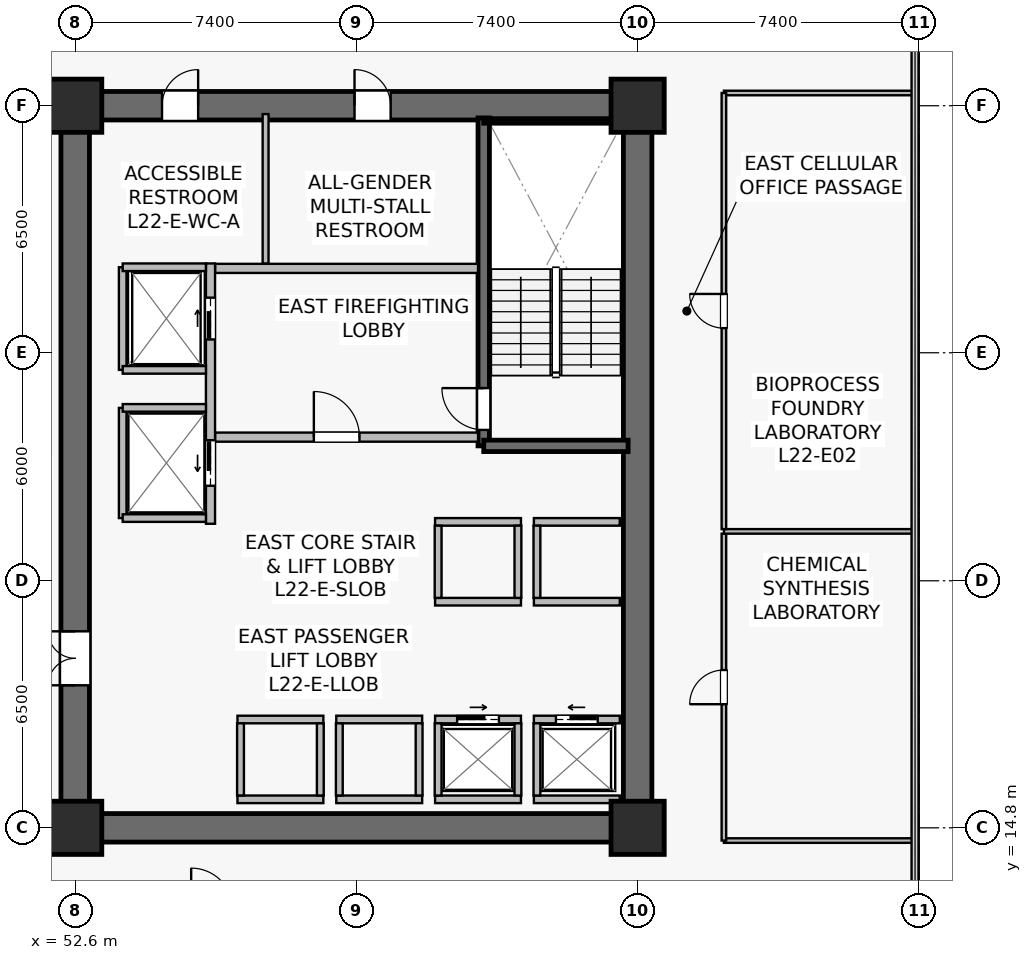
"""IFC4 building model, lengths in metres.
Left out: names, types, materials, properties, quantities, classifications, styles, units other than length and angle.
Written with IfcOpenShell. Run it as: python <this file> out.ifc"""

import sys

from ifc_helpers import new_model, si_unit, direction, frame, frame_2d, origin, origin_2d, place, context, subcontext, project, spatial, rectangle, extrude, source, transform, mapped, element, fill, save


model = new_model("IFC4")
c1 = context("Model", 3, precision=1e-05, world=origin(), true_north=direction((0.0, 1.0)))
c2 = subcontext(c1, "Body", "Model", "MODEL_VIEW")
j1 = project(units=[si_unit("LENGTHUNIT", "METRE"), si_unit("PLANEANGLEUNIT", "RADIAN")], contexts=[c1])
p1 = place(None, origin())
s1 = spatial("IfcSite", under=j1, at=p1, CompositionType="ELEMENT")
p2 = place(p1, origin())
s2 = spatial("IfcBuilding", under=s1, at=p2, CompositionType="ELEMENT")
p3 = place(p2, frame((0.0, 0.0, 90.8)))
s3 = spatial("IfcBuildingStorey", under=s2, at=p3, CompositionType="ELEMENT", Elevation=90.8)
p4 = place(p3, frame((52.225, 14.8, 0.0), z_axis=(0.0, 0.0, 1.0), x_axis=(1.0, 0.0, 0.0)))
e1 = element("IfcWall", 1, at=p4, inside=s3, PredefinedType="SHEAR", context=c2, shape_type="SweptSolid", body=[
    extrude(rectangle(XDim=15.55, YDim=0.75, at=frame_2d((7.775, 0.0))), origin(), (0.0, 0.0, 1.0), 3.78),
])
p5 = place(p3, frame((52.225, 33.8, 0.0), z_axis=(0.0, 0.0, 1.0), x_axis=(1.0, 0.0, 0.0)))
e2 = element("IfcWall", 2, at=p5, inside=s3, PredefinedType="SHEAR", context=c2, shape_type="SweptSolid", body=[
    extrude(rectangle(XDim=15.55, YDim=0.75, at=frame_2d((7.775, 0.0))), origin(), (0.0, 0.0, 1.0), 3.78),
])
p6 = place(p5, frame((7.725, 0.0, 0.0)))
e3 = element("IfcOpeningElement", 3, at=p6, cuts=e2, PredefinedType="OPENING", context=c2, shape_type="SweptSolid", body=[
    extrude(rectangle(XDim=0.95, YDim=2.15, at=frame_2d((0.475, 1.075))), frame((0.0, 0.385, 0.0), z_axis=(0.0, -1.0, 0.0), x_axis=(1.0, 0.0, 0.0)), (0.0, 0.0, 1.0), 0.77),
])
p7 = place(p5, frame((2.66, 0.0, 0.0)))
e4 = element("IfcOpeningElement", 4, at=p7, cuts=e2, PredefinedType="OPENING", context=c2, shape_type="SweptSolid", body=[
    extrude(rectangle(XDim=0.95, YDim=2.15, at=frame_2d((0.475, 1.075))), frame((0.0, 0.385, 0.0), z_axis=(0.0, -1.0, 0.0), x_axis=(1.0, 0.0, 0.0)), (0.0, 0.0, 1.0), 0.77),
])
p8 = place(p3, frame((52.6, 15.175, 0.0), z_axis=(0.0, 0.0, 1.0), x_axis=(0.0, 1.0, 0.0)))
e5 = element("IfcWall", 5, at=p8, inside=s3, PredefinedType="SHEAR", context=c2, shape_type="SweptSolid", body=[
    extrude(rectangle(XDim=18.25, YDim=0.75, at=frame_2d((9.125, 0.0))), origin(), (0.0, 0.0, 1.0), 3.78),
])
p9 = place(p8, frame((3.375, 0.0, 0.0)))
e6 = element("IfcOpeningElement", 6, at=p9, cuts=e5, PredefinedType="OPENING", context=c2, shape_type="SweptSolid", body=[
    extrude(rectangle(XDim=1.42, YDim=2.2, at=frame_2d((0.71, 1.1))), frame((0.0, 0.385, 0.0), z_axis=(0.0, -1.0, 0.0), x_axis=(1.0, 0.0, 0.0)), (0.0, 0.0, 1.0), 0.77),
])
p10 = place(p3, frame((67.4, 15.175, 0.0), z_axis=(0.0, 0.0, 1.0), x_axis=(0.0, 1.0, 0.0)))
e7 = element("IfcWall", 7, at=p10, inside=s3, PredefinedType="SHEAR", context=c2, shape_type="SweptSolid", body=[
    extrude(rectangle(XDim=18.25, YDim=0.75, at=frame_2d((9.125, 0.0))), origin(), (0.0, 0.0, 1.0), 3.78),
])
p11 = place(p3, frame((63.35, 24.85, 0.0), z_axis=(0.0, 0.0, 1.0), x_axis=(0.0, 1.0, 0.0)))
e8 = element("IfcWall", 8, at=p11, inside=s3, PredefinedType="SHEAR", context=c2, shape_type="SweptSolid", body=[
    extrude(rectangle(XDim=8.63, YDim=0.3, at=frame_2d((4.315, 0.0))), origin(), (0.0, 0.0, 1.0), 3.78),
])
p12 = place(p11, frame((0.42, 0.0, 0.0)))
e9 = element("IfcOpeningElement", 9, at=p12, cuts=e8, PredefinedType="OPENING", context=c2, shape_type="SweptSolid", body=[
    extrude(rectangle(XDim=1.1, YDim=2.15, at=frame_2d((0.55, 1.075))), frame((0.0, 0.16, 0.0), z_axis=(0.0, -1.0, 0.0), x_axis=(1.0, 0.0, 0.0)), (0.0, 0.0, 1.0), 0.32),
])
p13 = place(p3, frame((63.35, 24.85, 0.0), z_axis=(0.0, 0.0, 1.0), x_axis=(1.0, 0.0, 0.0)))
e10 = element("IfcWall", 10, at=p13, inside=s3, PredefinedType="SHEAR", context=c2, shape_type="SweptSolid", body=[
    extrude(rectangle(XDim=3.8, YDim=0.3, at=frame_2d((1.9, 0.0))), origin(), (0.0, 0.0, 1.0), 3.78),
])
p14 = place(p3, frame((63.35, 33.4, 0.0), z_axis=(0.0, 0.0, 1.0), x_axis=(1.0, 0.0, 0.0)))
e11 = element("IfcWall", 11, at=p14, inside=s3, PredefinedType="SOLIDWALL", context=c2, shape_type="SweptSolid", body=[
    extrude(rectangle(XDim=3.72, YDim=0.12, at=frame_2d((1.86, 0.0))), origin(), (0.0, 0.0, 1.0), 3.78),
])
m1 = source(origin(), c2, "Body", "SweptSolid", [
    extrude(rectangle(XDim=1.4, YDim=1.4, at=origin_2d()), origin(), (0.0, 0.0, 1.0), 4.1),
])
for number, where, z_axis, x_axis in (
    (12, (52.6, 14.8, 0.0), (0.0, 0.0, 1.0), (1.0, 0.0, 0.0)),
    (13, (67.4, 14.8, 0.0), (0.0, 0.0, 1.0), (1.0, 0.0, 0.0)),
    (14, (52.6, 33.8, 0.0), (0.0, 0.0, 1.0), (1.0, 0.0, 0.0)),
    (15, (67.4, 33.8, 0.0), (0.0, 0.0, 1.0), (1.0, 0.0, 0.0)),
):
    element("IfcColumn", number, at=place(p3, frame(where, z_axis=z_axis, x_axis=x_axis)), inside=s3, PredefinedType="COLUMN", context=c2, shape_type="MappedRepresentation", body=[
        mapped(m1, transform((0.0, 0.0, 0.0), scale=1.0)),
    ])
p15 = place(p3, frame((56.28, 25.08, 0.0), z_axis=(0.0, 0.0, 1.0), x_axis=(1.0, 0.0, 0.0)))
e16 = element("IfcWall", 16, at=p15, inside=s3, PredefinedType="SOLIDWALL", context=c2, shape_type="SweptSolid", body=[
    extrude(rectangle(XDim=6.92, YDim=0.24, at=frame_2d((3.46, 0.0))), origin(), (0.0, 0.0, 1.0), 3.115),
])
p16 = place(p15, frame((2.6, 0.0, 0.0)))
e17 = element("IfcOpeningElement", 17, at=p16, cuts=e16, PredefinedType="OPENING", context=c2, shape_type="SweptSolid", body=[
    extrude(rectangle(XDim=1.2, YDim=2.16, at=frame_2d((0.6, 1.08))), frame((0.0, 0.13, 0.0), z_axis=(0.0, -1.0, 0.0), x_axis=(1.0, 0.0, 0.0)), (0.0, 0.0, 1.0), 0.26),
])
p17 = place(p3, frame((56.28, 29.52, 0.0), z_axis=(0.0, 0.0, 1.0), x_axis=(1.0, 0.0, 0.0)))
e18 = element("IfcWall", 18, at=p17, inside=s3, PredefinedType="SOLIDWALL", context=c2, shape_type="SweptSolid", body=[
    extrude(rectangle(XDim=6.92, YDim=0.24, at=frame_2d((3.46, 0.0))), origin(), (0.0, 0.0, 1.0), 3.115),
])
p18 = place(p3, frame((56.16, 22.8, 0.0), z_axis=(0.0, 0.0, 1.0), x_axis=(0.0, 1.0, 0.0)))
e19 = element("IfcWall", 19, at=p18, inside=s3, PredefinedType="SOLIDWALL", context=c2, shape_type="SweptSolid", body=[
    extrude(rectangle(XDim=6.85, YDim=0.24, at=frame_2d((3.425, 0.0))), origin(), (0.0, 0.0, 1.0), 2.865),
])
p19 = place(p18, frame((4.85, 0.0, 0.0)))
e20 = element("IfcOpeningElement", 20, at=p19, cuts=e19, PredefinedType="OPENING", context=c2, shape_type="SweptSolid", body=[
    extrude(rectangle(XDim=1.1, YDim=2.22, at=frame_2d((0.55, 1.11))), frame((0.0, 0.13, 0.0), z_axis=(0.0, -1.0, 0.0), x_axis=(1.0, 0.0, 0.0)), (0.0, 0.0, 1.0), 0.26),
])
p20 = place(p18, frame((1.0, 0.0, 0.0)))
e21 = element("IfcOpeningElement", 21, at=p20, cuts=e19, PredefinedType="OPENING", context=c2, shape_type="SweptSolid", body=[
    extrude(rectangle(XDim=1.2, YDim=2.22, at=frame_2d((0.6, 1.11))), frame((0.0, 0.13, 0.0), z_axis=(0.0, -1.0, 0.0), x_axis=(1.0, 0.0, 0.0)), (0.0, 0.0, 1.0), 0.26),
])
p21 = place(p3, frame((64.67, 17.65, 0.0), z_axis=(0.0, 0.0, 1.0), x_axis=(1.0, 0.0, 0.0)))
e22 = element("IfcWall", 22, at=p21, inside=s3, PredefinedType="SOLIDWALL", context=c2, shape_type="SweptSolid", body=[
    extrude(rectangle(XDim=2.26, YDim=0.2, at=frame_2d((1.13, 0.0))), origin(), (0.0, 0.0, 1.0), 3.78),
])
p22 = place(p21, frame((0.58, 0.0, 0.0)))
e23 = element("IfcOpeningElement", 23, at=p22, cuts=e22, PredefinedType="OPENING", context=c2, shape_type="SweptSolid", body=[
    extrude(rectangle(XDim=1.1, YDim=2.22, at=frame_2d((0.55, 1.11))), frame((0.0, 0.11, 0.0), z_axis=(0.0, -1.0, 0.0), x_axis=(1.0, 0.0, 0.0)), (0.0, 0.0, 1.0), 0.22),
])
p23 = place(p3, frame((64.67, 15.55, 0.0), z_axis=(0.0, 0.0, 1.0), x_axis=(1.0, 0.0, 0.0)))
e24 = element("IfcWall", 24, at=p23, inside=s3, PredefinedType="SOLIDWALL", context=c2, shape_type="SweptSolid", body=[
    extrude(rectangle(XDim=2.26, YDim=0.2, at=frame_2d((1.13, 0.0))), origin(), (0.0, 0.0, 1.0), 3.78),
])
p24 = place(p3, frame((64.75, 15.65, 0.0), z_axis=(0.0, 0.0, 1.0), x_axis=(0.0, 1.0, 0.0)))
e25 = element("IfcWall", 25, at=p24, inside=s3, PredefinedType="SOLIDWALL", context=c2, shape_type="SweptSolid", body=[
    extrude(rectangle(XDim=1.9, YDim=0.18, at=frame_2d((0.95, 0.0))), origin(), (0.0, 0.0, 1.0), 3.78),
])
p25 = place(p3, frame((62.07, 17.65, 0.0), z_axis=(0.0, 0.0, 1.0), x_axis=(1.0, 0.0, 0.0)))
e26 = element("IfcWall", 26, at=p25, inside=s3, PredefinedType="SOLIDWALL", context=c2, shape_type="SweptSolid", body=[
    extrude(rectangle(XDim=2.26, YDim=0.2, at=frame_2d((1.13, 0.0))), origin(), (0.0, 0.0, 1.0), 3.78),
])
p26 = place(p25, frame((0.58, 0.0, 0.0)))
e27 = element("IfcOpeningElement", 27, at=p26, cuts=e26, PredefinedType="OPENING", context=c2, shape_type="SweptSolid", body=[
    extrude(rectangle(XDim=1.1, YDim=2.22, at=frame_2d((0.55, 1.11))), frame((0.0, 0.11, 0.0), z_axis=(0.0, -1.0, 0.0), x_axis=(1.0, 0.0, 0.0)), (0.0, 0.0, 1.0), 0.22),
])
p27 = place(p3, frame((62.07, 15.55, 0.0), z_axis=(0.0, 0.0, 1.0), x_axis=(1.0, 0.0, 0.0)))
e28 = element("IfcWall", 28, at=p27, inside=s3, PredefinedType="SOLIDWALL", context=c2, shape_type="SweptSolid", body=[
    extrude(rectangle(XDim=2.26, YDim=0.2, at=frame_2d((1.13, 0.0))), origin(), (0.0, 0.0, 1.0), 3.78),
])
for number, where, z_axis, x_axis in (
    (29, (62.15, 15.65, 0.0), (0.0, 0.0, 1.0), (0.0, 1.0, 0.0)),
    (30, (64.25, 15.65, 0.0), (0.0, 0.0, 1.0), (0.0, 1.0, 0.0)),
):
    element("IfcWall", number, at=place(p3, frame(where, z_axis=z_axis, x_axis=x_axis)), inside=s3, PredefinedType="SOLIDWALL", context=c2, shape_type="SweptSolid", body=[
        extrude(rectangle(XDim=1.9, YDim=0.18, at=frame_2d((0.95, 0.0))), origin(), (0.0, 0.0, 1.0), 3.78),
    ])
for number, where, z_axis, x_axis in (
    (31, (59.47, 17.65, 0.0), (0.0, 0.0, 1.0), (1.0, 0.0, 0.0)),
    (32, (59.47, 15.55, 0.0), (0.0, 0.0, 1.0), (1.0, 0.0, 0.0)),
):
    element("IfcWall", number, at=place(p3, frame(where, z_axis=z_axis, x_axis=x_axis)), inside=s3, PredefinedType="SOLIDWALL", context=c2, shape_type="SweptSolid", body=[
        extrude(rectangle(XDim=2.26, YDim=0.2, at=frame_2d((1.13, 0.0))), origin(), (0.0, 0.0, 1.0), 3.115),
    ])
for number, where, z_axis, x_axis in (
    (33, (59.55, 15.65, 0.0), (0.0, 0.0, 1.0), (0.0, 1.0, 0.0)),
    (34, (61.65, 15.65, 0.0), (0.0, 0.0, 1.0), (0.0, 1.0, 0.0)),
):
    element("IfcWall", number, at=place(p3, frame(where, z_axis=z_axis, x_axis=x_axis)), inside=s3, PredefinedType="SOLIDWALL", context=c2, shape_type="SweptSolid", body=[
        extrude(rectangle(XDim=1.9, YDim=0.18, at=frame_2d((0.95, 0.0))), origin(), (0.0, 0.0, 1.0), 3.78),
    ])
for number, where, z_axis, x_axis in (
    (35, (56.87, 17.65, 0.0), (0.0, 0.0, 1.0), (1.0, 0.0, 0.0)),
    (36, (56.87, 15.55, 0.0), (0.0, 0.0, 1.0), (1.0, 0.0, 0.0)),
):
    element("IfcWall", number, at=place(p3, frame(where, z_axis=z_axis, x_axis=x_axis)), inside=s3, PredefinedType="SOLIDWALL", context=c2, shape_type="SweptSolid", body=[
        extrude(rectangle(XDim=2.26, YDim=0.2, at=frame_2d((1.13, 0.0))), origin(), (0.0, 0.0, 1.0), 3.78),
    ])
for number, where, z_axis, x_axis in (
    (37, (56.95, 15.65, 0.0), (0.0, 0.0, 1.0), (0.0, 1.0, 0.0)),
    (38, (59.05, 15.65, 0.0), (0.0, 0.0, 1.0), (0.0, 1.0, 0.0)),
):
    element("IfcWall", number, at=place(p3, frame(where, z_axis=z_axis, x_axis=x_axis)), inside=s3, PredefinedType="SOLIDWALL", context=c2, shape_type="SweptSolid", body=[
        extrude(rectangle(XDim=1.9, YDim=0.18, at=frame_2d((0.95, 0.0))), origin(), (0.0, 0.0, 1.0), 3.78),
    ])
for number, where, z_axis, x_axis in (
    (39, (64.67, 20.75, 0.0), (0.0, 0.0, 1.0), (1.0, 0.0, 0.0)),
    (40, (64.67, 22.85, 0.0), (0.0, 0.0, 1.0), (1.0, 0.0, 0.0)),
):
    element("IfcWall", number, at=place(p3, frame(where, z_axis=z_axis, x_axis=x_axis)), inside=s3, PredefinedType="SOLIDWALL", context=c2, shape_type="SweptSolid", body=[
        extrude(rectangle(XDim=2.26, YDim=0.2, at=frame_2d((1.13, 0.0))), origin(), (0.0, 0.0, 1.0), 3.78),
    ])
p28 = place(p3, frame((64.75, 20.85, 0.0), z_axis=(0.0, 0.0, 1.0), x_axis=(0.0, 1.0, 0.0)))
e41 = element("IfcWall", 41, at=p28, inside=s3, PredefinedType="SOLIDWALL", context=c2, shape_type="SweptSolid", body=[
    extrude(rectangle(XDim=1.9, YDim=0.18, at=frame_2d((0.95, 0.0))), origin(), (0.0, 0.0, 1.0), 3.78),
])
for number, where, z_axis, x_axis in (
    (42, (62.07, 20.75, 0.0), (0.0, 0.0, 1.0), (1.0, 0.0, 0.0)),
    (43, (62.07, 22.85, 0.0), (0.0, 0.0, 1.0), (1.0, 0.0, 0.0)),
):
    element("IfcWall", number, at=place(p3, frame(where, z_axis=z_axis, x_axis=x_axis)), inside=s3, PredefinedType="SOLIDWALL", context=c2, shape_type="SweptSolid", body=[
        extrude(rectangle(XDim=2.26, YDim=0.2, at=frame_2d((1.13, 0.0))), origin(), (0.0, 0.0, 1.0), 3.78),
    ])
for number, where, z_axis, x_axis in (
    (44, (62.15, 20.85, 0.0), (0.0, 0.0, 1.0), (0.0, 1.0, 0.0)),
    (45, (64.25, 20.85, 0.0), (0.0, 0.0, 1.0), (0.0, 1.0, 0.0)),
):
    element("IfcWall", number, at=place(p3, frame(where, z_axis=z_axis, x_axis=x_axis)), inside=s3, PredefinedType="SOLIDWALL", context=c2, shape_type="SweptSolid", body=[
        extrude(rectangle(XDim=1.9, YDim=0.18, at=frame_2d((0.95, 0.0))), origin(), (0.0, 0.0, 1.0), 3.78),
    ])
p29 = place(p3, frame((53.85, 26.85, 0.0), z_axis=(0.0, 0.0, 1.0), x_axis=(0.0, 1.0, 0.0)))
e46 = element("IfcWall", 46, at=p29, inside=s3, PredefinedType="SOLIDWALL", context=c2, shape_type="SweptSolid", body=[
    extrude(rectangle(XDim=2.7, YDim=0.2, at=frame_2d((1.35, 0.0))), origin(), (0.0, 0.0, 1.0), 3.78),
])
p30 = place(p3, frame((53.85, 29.55, 0.0), z_axis=(0.0, 0.0, 1.0), x_axis=(1.0, 0.0, 0.0)))
e47 = element("IfcWall", 47, at=p30, inside=s3, PredefinedType="SOLIDWALL", context=c2, shape_type="SweptSolid", body=[
    extrude(rectangle(XDim=2.19, YDim=0.2, at=frame_2d((1.095, 0.0))), origin(), (0.0, 0.0, 1.0), 3.78),
])
p31 = place(p3, frame((53.85, 26.85, 0.0), z_axis=(0.0, 0.0, 1.0), x_axis=(1.0, 0.0, 0.0)))
e48 = element("IfcWall", 48, at=p31, inside=s3, PredefinedType="SOLIDWALL", context=c2, shape_type="SweptSolid", body=[
    extrude(rectangle(XDim=2.19, YDim=0.2, at=frame_2d((1.095, 0.0))), origin(), (0.0, 0.0, 1.0), 3.177),
])
p32 = place(p3, frame((53.85, 22.95, 0.0), z_axis=(0.0, 0.0, 1.0), x_axis=(0.0, 1.0, 0.0)))
e49 = element("IfcWall", 49, at=p32, inside=s3, PredefinedType="SOLIDWALL", context=c2, shape_type="SweptSolid", body=[
    extrude(rectangle(XDim=2.9, YDim=0.2, at=frame_2d((1.45, 0.0))), origin(), (0.0, 0.0, 1.0), 2.865),
])
for number, where, z_axis, x_axis in (
    (50, (53.85, 25.85, 0.0), (0.0, 0.0, 1.0), (1.0, 0.0, 0.0)),
    (51, (53.85, 22.95, 0.0), (0.0, 0.0, 1.0), (1.0, 0.0, 0.0)),
):
    element("IfcWall", number, at=place(p3, frame(where, z_axis=z_axis, x_axis=x_axis)), inside=s3, PredefinedType="SOLIDWALL", context=c2, shape_type="SweptSolid", body=[
        extrude(rectangle(XDim=2.19, YDim=0.2, at=frame_2d((1.095, 0.0))), origin(), (0.0, 0.0, 1.0), 3.78),
    ])
p33 = place(p3, frame((57.61, 29.65, 0.0), z_axis=(0.0, 0.0, 1.0), x_axis=(0.0, 1.0, 0.0)))
e52 = element("IfcWall", 52, at=p33, inside=s3, PredefinedType="PLUMBINGWALL", context=c2, shape_type="SweptSolid", body=[
    extrude(rectangle(XDim=3.93, YDim=0.155, at=frame_2d((1.965, 0.0))), origin(), (0.0, 0.0, 1.0), 3.78),
])
for number, where, z_axis, x_axis in (
    (53, (69.67, 14.465, 0.0), (0.0, 0.0, 1.0), (1.0, 0.0, 0.0)),
    (54, (69.67, 34.135, 0.0), (0.0, 0.0, 1.0), (1.0, 0.0, 0.0)),
):
    element("IfcWall", number, at=place(p3, frame(where, z_axis=z_axis, x_axis=x_axis)), inside=s3, PredefinedType="PARTITIONING", context=c2, shape_type="SweptSolid", body=[
        extrude(rectangle(XDim=5.02, YDim=0.12, at=frame_2d((2.51, 0.0))), origin(), (0.0, 0.0, 1.0), 3.78),
    ])
p34 = place(p3, frame((69.67, 14.465, 0.0), z_axis=(0.0, 0.0, 1.0), x_axis=(0.0, 1.0, 0.0)))
e55 = element("IfcWall", 55, at=p34, inside=s3, PredefinedType="PARTITIONING", context=c2, shape_type="SweptSolid", body=[
    extrude(rectangle(XDim=8.075, YDim=0.12, at=frame_2d((4.038, 0.0))), origin(), (0.0, 0.0, 1.0), 3.78),
])
p35 = place(p34, frame((3.587, 0.0, 0.0)))
e56 = element("IfcOpeningElement", 56, at=p35, cuts=e55, PredefinedType="OPENING", context=c2, shape_type="SweptSolid", body=[
    extrude(rectangle(XDim=0.9, YDim=2.1, at=frame_2d((0.45, 1.05))), frame((0.0, 0.07, 0.0), z_axis=(0.0, -1.0, 0.0), x_axis=(1.0, 0.0, 0.0)), (0.0, 0.0, 1.0), 0.14),
])
p36 = place(p3, frame((69.67, 22.6, 0.0), z_axis=(0.0, 0.0, 1.0), x_axis=(1.0, 0.0, 0.0)))
e57 = element("IfcWall", 57, at=p36, inside=s3, PredefinedType="PARTITIONING", context=c2, shape_type="SweptSolid", body=[
    extrude(rectangle(XDim=5.02, YDim=0.12, at=frame_2d((2.51, 0.0))), origin(), (0.0, 0.0, 1.0), 3.78),
])
p37 = place(p3, frame((69.67, 22.66, 0.0), z_axis=(0.0, 0.0, 1.0), x_axis=(0.0, 1.0, 0.0)))
e58 = element("IfcWall", 58, at=p37, inside=s3, PredefinedType="PARTITIONING", context=c2, shape_type="SweptSolid", body=[
    extrude(rectangle(XDim=11.475, YDim=0.12, at=frame_2d((5.738, 0.0))), origin(), (0.0, 0.0, 1.0), 3.78),
])
p38 = place(p37, frame((5.288, 0.0, 0.0)))
e59 = element("IfcOpeningElement", 59, at=p38, cuts=e58, PredefinedType="OPENING", context=c2, shape_type="SweptSolid", body=[
    extrude(rectangle(XDim=0.9, YDim=2.1, at=frame_2d((0.45, 1.05))), frame((0.0, 0.07, 0.0), z_axis=(0.0, -1.0, 0.0), x_axis=(1.0, 0.0, 0.0)), (0.0, 0.0, 1.0), 0.14),
])
m2 = source(origin(), c2, "Body", "SweptSolid", [
    extrude(rectangle(XDim=1.1, YDim=2.15, at=frame_2d((0.55, 1.075))), frame((0.0, 0.025, 0.0), z_axis=(0.0, -1.0, 0.0), x_axis=(1.0, 0.0, 0.0)), (0.0, 0.0, 1.0), 0.05),
])
p39 = place(p12, origin())
e60 = element("IfcDoor", 60, at=p39, inside=s3, OperationType="SINGLE_SWING_RIGHT", PredefinedType="DOOR", context=c2, shape_type="MappedRepresentation", body=[
    mapped(m2, transform((0.0, 0.0, 0.0), scale=1.0)),
])
fill(e9, e60)
m3 = source(origin(), c2, "Body", "SweptSolid", [
    extrude(rectangle(XDim=1.2, YDim=2.16, at=frame_2d((0.6, 1.08))), frame((0.0, 0.025, 0.0), z_axis=(0.0, -1.0, 0.0), x_axis=(1.0, 0.0, 0.0)), (0.0, 0.0, 1.0), 0.05),
])
p40 = place(p16, origin())
e61 = element("IfcDoor", 61, at=p40, inside=s3, OperationType="SINGLE_SWING_LEFT", PredefinedType="DOOR", context=c2, shape_type="MappedRepresentation", body=[
    mapped(m3, transform((0.0, 0.0, 0.0), scale=1.0)),
])
fill(e17, e61)
m4 = source(origin(), c2, "Body", "SweptSolid", [
    extrude(rectangle(XDim=1.1, YDim=2.22, at=frame_2d((0.55, 1.11))), frame((0.0, 0.025, 0.0), z_axis=(0.0, -1.0, 0.0), x_axis=(1.0, 0.0, 0.0)), (0.0, 0.0, 1.0), 0.05),
])
p41 = place(p22, origin())
e62 = element("IfcDoor", 62, at=p41, inside=s3, OperationType="SLIDING_TO_LEFT", PredefinedType="USERDEFINED", context=c2, shape_type="MappedRepresentation", body=[
    mapped(m4, transform((0.0, 0.0, 0.0), scale=1.0)),
])
fill(e23, e62)
p42 = place(p26, origin())
e63 = element("IfcDoor", 63, at=p42, inside=s3, OperationType="SLIDING_TO_RIGHT", PredefinedType="USERDEFINED", context=c2, shape_type="MappedRepresentation", body=[
    mapped(m4, transform((0.0, 0.0, 0.0), scale=1.0)),
])
fill(e27, e63)
p43 = place(p19, origin())
e64 = element("IfcDoor", 64, at=p43, inside=s3, OperationType="SLIDING_TO_RIGHT", PredefinedType="USERDEFINED", context=c2, shape_type="MappedRepresentation", body=[
    mapped(m4, transform((0.0, 0.0, 0.0), scale=1.0)),
])
fill(e20, e64)
m5 = source(origin(), c2, "Body", "SweptSolid", [
    extrude(rectangle(XDim=1.2, YDim=2.22, at=frame_2d((0.6, 1.11))), frame((0.0, 0.025, 0.0), z_axis=(0.0, -1.0, 0.0), x_axis=(1.0, 0.0, 0.0)), (0.0, 0.0, 1.0), 0.05),
])
p44 = place(p20, origin())
e65 = element("IfcDoor", 65, at=p44, inside=s3, OperationType="SLIDING_TO_LEFT", PredefinedType="USERDEFINED", context=c2, shape_type="MappedRepresentation", body=[
    mapped(m5, transform((0.0, 0.0, 0.0), scale=1.0)),
])
fill(e21, e65)
m6 = source(origin(), c2, "Body", "SweptSolid", [
    extrude(rectangle(XDim=1.42, YDim=2.2, at=frame_2d((0.71, 1.1))), frame((0.0, 0.025, 0.0), z_axis=(0.0, -1.0, 0.0), x_axis=(1.0, 0.0, 0.0)), (0.0, 0.0, 1.0), 0.05),
])
p45 = place(p9, origin())
e66 = element("IfcDoor", 66, at=p45, inside=s3, OperationType="DOUBLE_DOOR_SINGLE_SWING", PredefinedType="DOOR", context=c2, shape_type="MappedRepresentation", body=[
    mapped(m6, transform((0.0, 0.0, 0.0), scale=1.0)),
])
fill(e6, e66)
m7 = source(origin(), c2, "Body", "SweptSolid", [
    extrude(rectangle(XDim=0.95, YDim=2.15, at=frame_2d((0.475, 1.075))), frame((0.0, 0.025, 0.0), z_axis=(0.0, -1.0, 0.0), x_axis=(1.0, 0.0, 0.0)), (0.0, 0.0, 1.0), 0.05),
])
p46 = place(p6, origin())
e67 = element("IfcDoor", 67, at=p46, inside=s3, OperationType="SINGLE_SWING_LEFT", PredefinedType="DOOR", context=c2, shape_type="MappedRepresentation", body=[
    mapped(m7, transform((0.0, 0.0, 0.0), scale=1.0)),
])
fill(e3, e67)
p47 = place(p7, origin())
e68 = element("IfcDoor", 68, at=p47, inside=s3, OperationType="SINGLE_SWING_RIGHT", PredefinedType="DOOR", context=c2, shape_type="MappedRepresentation", body=[
    mapped(m7, transform((0.0, 0.0, 0.0), scale=1.0)),
])
fill(e4, e68)
m8 = source(origin(), c2, "Body", "SweptSolid", [
    extrude(rectangle(XDim=0.9, YDim=2.1, at=frame_2d((0.45, 1.05))), frame((0.0, 0.025, 0.0), z_axis=(0.0, -1.0, 0.0), x_axis=(1.0, 0.0, 0.0)), (0.0, 0.0, 1.0), 0.05),
])
p48 = place(p35, origin())
e69 = element("IfcDoor", 69, at=p48, inside=s3, OperationType="SINGLE_SWING_LEFT", PredefinedType="DOOR", context=c2, shape_type="MappedRepresentation", body=[
    mapped(m8, transform((0.0, 0.0, 0.0), scale=1.0)),
])
fill(e56, e69)
p49 = place(p38, origin())
e70 = element("IfcDoor", 70, at=p49, inside=s3, OperationType="SINGLE_SWING_RIGHT", PredefinedType="DOOR", context=c2, shape_type="MappedRepresentation", body=[
    mapped(m8, transform((0.0, 0.0, 0.0), scale=1.0)),
])
fill(e59, e70)
save(model, sys.argv[1])
